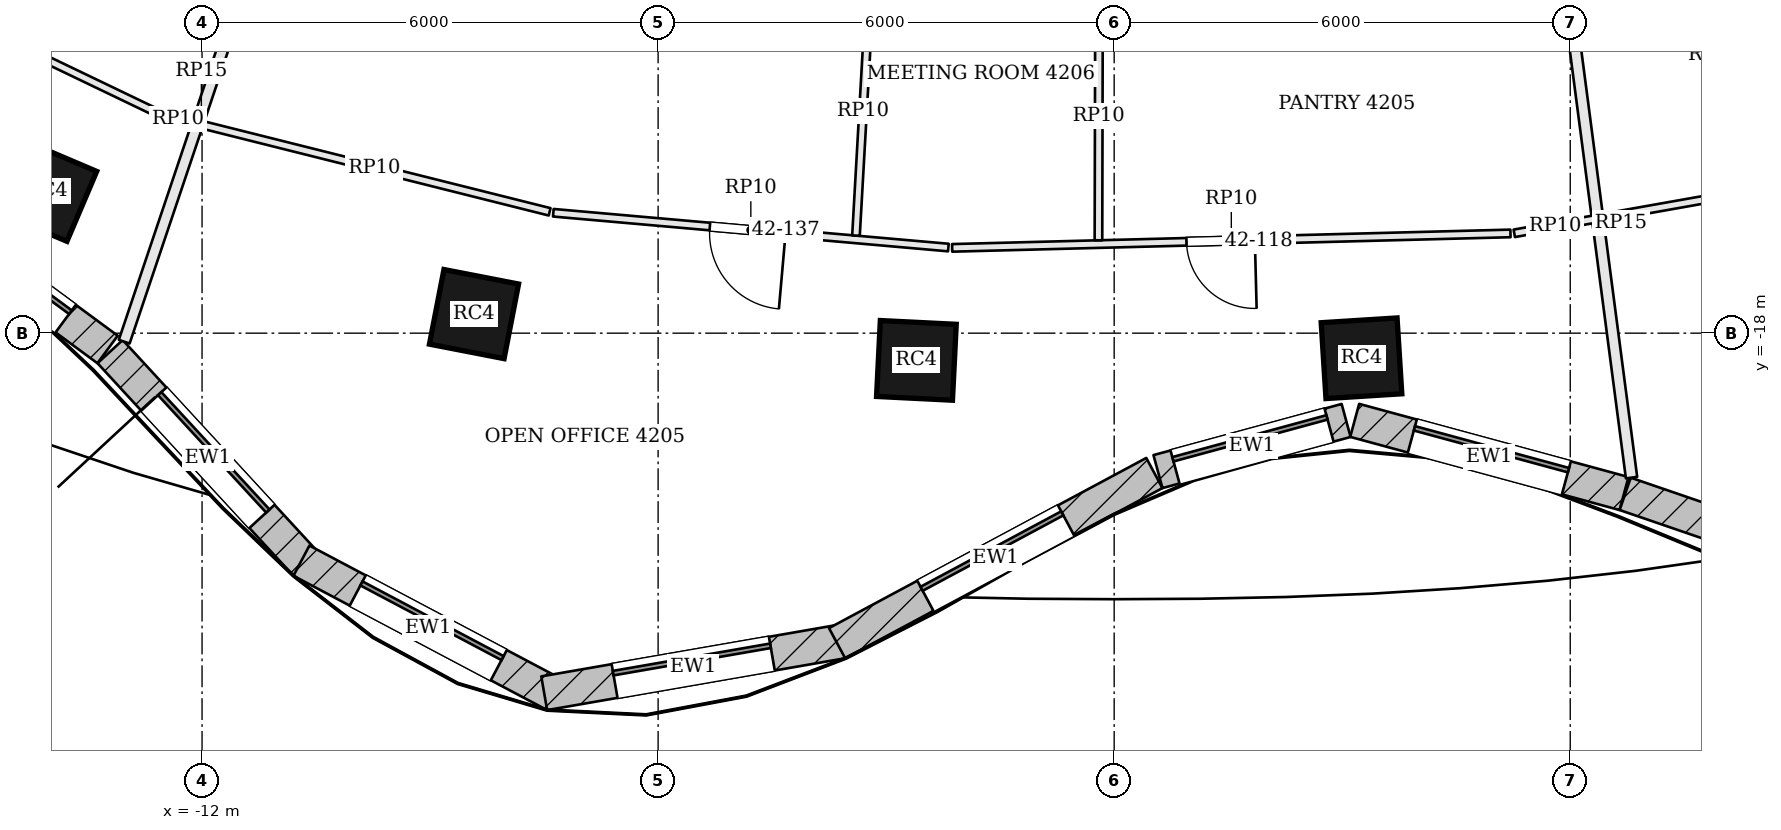
"""IFC4 building model, lengths in metres.
Left out: names, types, materials, properties, quantities, classifications, styles, units other than length and angle.
Written with IfcOpenShell. Run it as: python <this file> out.ifc"""

import sys

from ifc_helpers import new_model, si_unit, direction, frame, frame_2d, origin, origin_2d, place, context, subcontext, project, spatial, rectangle, extrude, element, fill, save


model = new_model("IFC4")
c1 = context("Model", 3, precision=1e-05, world=origin(), true_north=direction((0.0, 1.0)))
c2 = subcontext(c1, "Body", "Model", "MODEL_VIEW")
j1 = project(units=[si_unit("LENGTHUNIT", "METRE"), si_unit("PLANEANGLEUNIT", "RADIAN")], contexts=[c1])
p1 = place(None, origin())
s1 = spatial("IfcSite", under=j1, at=p1, CompositionType="ELEMENT")
p2 = place(p1, origin())
s2 = spatial("IfcBuilding", under=s1, at=p2, CompositionType="ELEMENT")
p3 = place(p2, frame((0.0, 0.0, 174.0)))
s3 = spatial("IfcBuildingStorey", under=s2, at=p3, CompositionType="ELEMENT", Elevation=174.0)
for number, where, z_axis, x_axis in (
    (1, (-14.042, -16.136, -0.7), (0.0, 0.0, 1.0), (0.92, -0.392, 0.0)),
    (2, (-8.422, -17.749, -0.7), (0.0, 0.0, 1.0), (0.982, -0.191, 0.0)),
    (3, (-2.602, -18.358, -0.7), (0.0, 0.0, 1.0), (0.999, -0.05, 0.0)),
    (4, (3.254, -18.33, -0.7), (0.0, 0.0, 1.0), (0.998, 0.063, 0.0)),
):
    element("IfcColumn", number, at=place(p3, frame(where, z_axis=z_axis, x_axis=x_axis)), inside=s3, PredefinedType="COLUMN", context=c2, shape_type="SweptSolid", body=[
        extrude(rectangle(XDim=1.0, YDim=1.0, at=origin_2d()), origin(), (0.0, 0.0, 1.0), 4.6),
    ])
p4 = place(p3, frame((-16.036, -16.158, 0.0), z_axis=(0.0, 0.0, 1.0), x_axis=(0.805181432967, -0.593028549064, 0.0)))
e5 = element("IfcWall", 5, at=p4, inside=s3, PredefinedType="SOLIDWALL", context=c2, shape_type="SweptSolid", body=[
    extrude(rectangle(XDim=3.469, YDim=0.45, at=frame_2d((1.734, 0.0))), origin(), (0.0, 0.0, 1.0), 3.7),
])
p5 = place(p4, frame((0.684, 0.0, 0.9)))
e6 = element("IfcOpeningElement", 6, at=p5, cuts=e5, PredefinedType="OPENING", context=c2, shape_type="SweptSolid", body=[
    extrude(rectangle(XDim=2.1, YDim=2.3, at=frame_2d((1.05, 1.15))), frame((0.0, 0.235, 0.0), z_axis=(0.0, -1.0, 0.0), x_axis=(1.0, 0.0, 0.0)), (0.0, 0.0, 1.0), 0.47),
])
p6 = place(p3, frame((-13.209, -18.243, 0.0), z_axis=(0.0, 0.0, 1.0), x_axis=(0.677612152497, -0.735419452278, 0.0)))
e7 = element("IfcWall", 7, at=p6, inside=s3, PredefinedType="SOLIDWALL", context=c2, shape_type="SweptSolid", body=[
    extrude(rectangle(XDim=3.797, YDim=0.45, at=frame_2d((1.898, 0.0))), origin(), (0.0, 0.0, 1.0), 3.7),
])
p7 = place(p6, frame((0.848, 0.0, 0.9)))
e8 = element("IfcOpeningElement", 8, at=p7, cuts=e7, PredefinedType="OPENING", context=c2, shape_type="SweptSolid", body=[
    extrude(rectangle(XDim=2.1, YDim=2.3, at=frame_2d((1.05, 1.15))), frame((0.0, 0.235, 0.0), z_axis=(0.0, -1.0, 0.0), x_axis=(1.0, 0.0, 0.0)), (0.0, 0.0, 1.0), 0.47),
])
p8 = place(p3, frame((-10.693, -20.993, 0.0), z_axis=(0.0, 0.0, 1.0), x_axis=(0.883817790726, -0.46783128668, 0.0)))
e9 = element("IfcWall", 9, at=p8, inside=s3, PredefinedType="SOLIDWALL", context=c2, shape_type="SweptSolid", body=[
    extrude(rectangle(XDim=3.777, YDim=0.45, at=frame_2d((1.888, 0.0))), origin(), (0.0, 0.0, 1.0), 3.7),
])
p9 = place(p8, frame((0.838, 0.0, 0.9)))
e10 = element("IfcOpeningElement", 10, at=p9, cuts=e9, PredefinedType="OPENING", context=c2, shape_type="SweptSolid", body=[
    extrude(rectangle(XDim=2.1, YDim=2.3, at=frame_2d((1.05, 1.15))), frame((0.0, 0.235, 0.0), z_axis=(0.0, -1.0, 0.0), x_axis=(1.0, 0.0, 0.0)), (0.0, 0.0, 1.0), 0.47),
])
p10 = place(p3, frame((-7.499, -22.737, 0.0), z_axis=(0.0, 0.0, 1.0), x_axis=(0.98521220506, 0.171338585849, 0.0)))
e11 = element("IfcWall", 11, at=p10, inside=s3, PredefinedType="SOLIDWALL", context=c2, shape_type="SweptSolid", body=[
    extrude(rectangle(XDim=3.98, YDim=0.45, at=frame_2d((1.99, 0.0))), origin(), (0.0, 0.0, 1.0), 3.7),
])
p11 = place(p10, frame((0.94, 0.0, 0.9)))
e12 = element("IfcOpeningElement", 12, at=p11, cuts=e11, PredefinedType="OPENING", context=c2, shape_type="SweptSolid", body=[
    extrude(rectangle(XDim=2.1, YDim=2.3, at=frame_2d((1.05, 1.15))), frame((0.0, 0.235, 0.0), z_axis=(0.0, -1.0, 0.0), x_axis=(1.0, 0.0, 0.0)), (0.0, 0.0, 1.0), 0.47),
])
p12 = place(p3, frame((-3.646, -22.079, 0.0), z_axis=(0.0, 0.0, 1.0), x_axis=(0.881279133897, 0.472596115259, 0.0)))
e13 = element("IfcWall", 13, at=p12, inside=s3, PredefinedType="SOLIDWALL", context=c2, shape_type="SweptSolid", body=[
    extrude(rectangle(XDim=4.737, YDim=0.45, at=frame_2d((2.368, 0.0))), origin(), (0.0, 0.0, 1.0), 3.7),
])
p13 = place(p12, frame((1.318, 0.0, 0.9)))
e14 = element("IfcOpeningElement", 14, at=p13, cuts=e13, PredefinedType="OPENING", context=c2, shape_type="SweptSolid", body=[
    extrude(rectangle(XDim=2.1, YDim=2.3, at=frame_2d((1.05, 1.15))), frame((0.0, 0.235, 0.0), z_axis=(0.0, -1.0, 0.0), x_axis=(1.0, 0.0, 0.0)), (0.0, 0.0, 1.0), 0.47),
])
p14 = place(p3, frame((0.576, -19.821, 0.0), z_axis=(0.0, 0.0, 1.0), x_axis=(0.965009398019, 0.262215296532, 0.0)))
e15 = element("IfcWall", 15, at=p14, inside=s3, PredefinedType="SOLIDWALL", context=c2, shape_type="SweptSolid", body=[
    extrude(rectangle(XDim=2.565, YDim=0.45, at=frame_2d((1.283, 0.0))), origin(), (0.0, 0.0, 1.0), 3.7),
])
p15 = place(p14, frame((0.233, 0.0, 0.9)))
e16 = element("IfcOpeningElement", 16, at=p15, cuts=e15, PredefinedType="OPENING", context=c2, shape_type="SweptSolid", body=[
    extrude(rectangle(XDim=2.1, YDim=2.3, at=frame_2d((1.05, 1.15))), frame((0.0, 0.235, 0.0), z_axis=(0.0, -1.0, 0.0), x_axis=(1.0, 0.0, 0.0)), (0.0, 0.0, 1.0), 0.47),
])
p16 = place(p3, frame((3.164, -19.147, 0.0), z_axis=(0.0, 0.0, 1.0), x_axis=(0.965039479998, -0.262104563191, 0.0)))
e17 = element("IfcWall", 17, at=p16, inside=s3, PredefinedType="SOLIDWALL", context=c2, shape_type="SweptSolid", body=[
    extrude(rectangle(XDim=3.672, YDim=0.45, at=frame_2d((1.836, 0.0))), origin(), (0.0, 0.0, 1.0), 3.7),
])
p17 = place(p16, frame((0.786, 0.0, 0.9)))
e18 = element("IfcOpeningElement", 18, at=p17, cuts=e17, PredefinedType="OPENING", context=c2, shape_type="SweptSolid", body=[
    extrude(rectangle(XDim=2.1, YDim=2.3, at=frame_2d((1.05, 1.15))), frame((0.0, 0.235, 0.0), z_axis=(0.0, -1.0, 0.0), x_axis=(1.0, 0.0, 0.0)), (0.0, 0.0, 1.0), 0.47),
])
p18 = place(p3, frame((6.723, -20.114, 0.0), z_axis=(0.0, 0.0, 1.0), x_axis=(0.945947299026, -0.324320377815, 0.0)))
e19 = element("IfcWall", 19, at=p18, inside=s3, PredefinedType="SOLIDWALL", context=c2, shape_type="SweptSolid", body=[
    extrude(rectangle(XDim=4.745, YDim=0.45, at=frame_2d((2.372, 0.0))), origin(), (0.0, 0.0, 1.0), 3.7),
])
p19 = place(p18, frame((1.322, 0.0, 0.9)))
e20 = element("IfcOpeningElement", 20, at=p19, cuts=e19, PredefinedType="OPENING", context=c2, shape_type="SweptSolid", body=[
    extrude(rectangle(XDim=2.1, YDim=2.3, at=frame_2d((1.05, 1.15))), frame((0.0, 0.235, 0.0), z_axis=(0.0, -1.0, 0.0), x_axis=(1.0, 0.0, 0.0)), (0.0, 0.0, 1.0), 0.47),
])
p20 = place(p3, frame((-13.024, -18.112, 0.0), z_axis=(0.0, 0.0, 1.0), x_axis=(0.319081027508, 0.947727438605, 0.0)))
e21 = element("IfcWall", 21, at=p20, inside=s3, PredefinedType="PARTITIONING", context=c2, shape_type="SweptSolid", body=[
    extrude(rectangle(XDim=6.363, YDim=0.15, at=frame_2d((3.181, 0.0))), origin(), (0.0, 0.0, 1.0), 3.234),
])
p21 = place(p3, frame((6.807, -19.901, 0.0), z_axis=(0.0, 0.0, 1.0), x_axis=(-0.129934596003, 0.991522566945, 0.0)))
e22 = element("IfcWall", 22, at=p21, inside=s3, PredefinedType="PARTITIONING", context=c2, shape_type="SweptSolid", body=[
    extrude(rectangle(XDim=6.766, YDim=0.15, at=frame_2d((3.383, 0.0))), origin(), (0.0, 0.0, 1.0), 3.234),
])
p22 = place(p3, frame((-12.078, -15.238, 0.0), z_axis=(0.0, 0.0, 1.0), x_axis=(-0.970024978464, 0.243005228658, 0.0)))
e23 = element("IfcWall", 23, at=p22, inside=s3, PredefinedType="PARTITIONING", context=c2, shape_type="SweptSolid", body=[
    extrude(rectangle(XDim=0.489, YDim=0.1, at=frame_2d((0.245, 0.0))), origin(), (0.0, 0.0, 1.0), 3.084),
])
p23 = place(p3, frame((-12.597, -15.098, 0.0), z_axis=(0.0, 0.0, 1.0), x_axis=(-0.901514437286, 0.432749025839, 0.0)))
e24 = element("IfcWall", 24, at=p23, inside=s3, PredefinedType="PARTITIONING", context=c2, shape_type="SweptSolid", body=[
    extrude(rectangle(XDim=4.42, YDim=0.1, at=frame_2d((2.21, 0.0))), origin(), (0.0, 0.0, 1.0), 3.084),
])
p24 = place(p3, frame((6.34, -16.496, 0.0), z_axis=(0.0, 0.0, 1.0), x_axis=(-0.984632558058, -0.174638843366, 0.0)))
e25 = element("IfcWall", 25, at=p24, inside=s3, PredefinedType="PARTITIONING", context=c2, shape_type="SweptSolid", body=[
    extrude(rectangle(XDim=1.093, YDim=0.1, at=frame_2d((0.547, 0.0))), origin(), (0.0, 0.0, 1.0), 3.084),
])
p25 = place(p3, frame((5.214, -16.688, 0.0), z_axis=(0.0, 0.0, 1.0), x_axis=(-0.999664981446, -0.025882906921, 0.0)))
e26 = element("IfcWall", 26, at=p25, inside=s3, PredefinedType="PARTITIONING", context=c2, shape_type="SweptSolid", body=[
    extrude(rectangle(XDim=7.348, YDim=0.1, at=frame_2d((3.674, 0.0))), origin(), (0.0, 0.0, 1.0), 3.084),
])
p26 = place(p25, frame((3.364, 0.0, 0.0)))
e27 = element("IfcOpeningElement", 27, at=p26, cuts=e26, PredefinedType="OPENING", context=c2, shape_type="SweptSolid", body=[
    extrude(rectangle(XDim=0.9, YDim=2.1, at=frame_2d((0.45, 1.05))), frame((0.0, 0.06, 0.0), z_axis=(0.0, -1.0, 0.0), x_axis=(1.0, 0.0, 0.0)), (0.0, 0.0, 1.0), 0.12),
])
p27 = place(p3, frame((-2.181, -16.874, 0.0), z_axis=(0.0, 0.0, 1.0), x_axis=(-0.996143934904, 0.087734035321, 0.0)))
e28 = element("IfcWall", 28, at=p27, inside=s3, PredefinedType="PARTITIONING", context=c2, shape_type="SweptSolid", body=[
    extrude(rectangle(XDim=5.218, YDim=0.1, at=frame_2d((2.609, 0.0))), origin(), (0.0, 0.0, 1.0), 3.084),
])
p28 = place(p27, frame((2.15, 0.0, 0.0)))
e29 = element("IfcOpeningElement", 29, at=p28, cuts=e28, PredefinedType="OPENING", context=c2, shape_type="SweptSolid", body=[
    extrude(rectangle(XDim=1.0, YDim=2.1, at=frame_2d((0.5, 1.05))), frame((0.0, 0.06, 0.0), z_axis=(0.0, -1.0, 0.0), x_axis=(1.0, 0.0, 0.0)), (0.0, 0.0, 1.0), 0.12),
])
p29 = place(p3, frame((-7.427, -16.404, 0.0), z_axis=(0.0, 0.0, 1.0), x_axis=(-0.970009433409, 0.243067272783, 0.0)))
e30 = element("IfcWall", 30, at=p29, inside=s3, PredefinedType="PARTITIONING", context=c2, shape_type="SweptSolid", body=[
    extrude(rectangle(XDim=4.754, YDim=0.1, at=frame_2d((2.377, 0.0))), origin(), (0.0, 0.0, 1.0), 3.084),
])
p30 = place(p3, frame((-3.211, -13.445, 0.0), z_axis=(0.0, 0.0, 1.0), x_axis=(-0.056703901856, -0.99839103938, 0.0)))
e31 = element("IfcWall", 31, at=p30, inside=s3, PredefinedType="PARTITIONING", context=c2, shape_type="SweptSolid", body=[
    extrude(rectangle(XDim=3.277, YDim=0.1, at=frame_2d((1.638, 0.0))), origin(), (0.0, 0.0, 1.0), 3.084),
])
p31 = place(p3, frame((-0.199, -13.502, 0.0), z_axis=(0.0, 0.0, 1.0), x_axis=(-0.002309978934, -0.999997331995, 0.0)))
e32 = element("IfcWall", 32, at=p31, inside=s3, PredefinedType="PARTITIONING", context=c2, shape_type="SweptSolid", body=[
    extrude(rectangle(XDim=3.276, YDim=0.1, at=frame_2d((1.638, 0.0))), origin(), (0.0, 0.0, 1.0), 3.084),
])
p32 = place(p3, frame((10.441, -15.769, 0.0), z_axis=(0.0, 0.0, 1.0), x_axis=(-0.984637220861, -0.174612551941, 0.0)))
e33 = element("IfcWall", 33, at=p32, inside=s3, PredefinedType="PARTITIONING", context=c2, shape_type="SweptSolid", body=[
    extrude(rectangle(XDim=4.125, YDim=0.1, at=frame_2d((2.062, 0.0))), origin(), (0.0, 0.0, 1.0), 3.084),
])
p33 = place(p5, origin())
e34 = element("IfcWindow", 34, at=p33, inside=s3, PartitioningType="SINGLE_PANEL", PredefinedType="WINDOW", context=c2, shape_type="SweptSolid", body=[
    extrude(rectangle(XDim=2.1, YDim=2.3, at=frame_2d((1.05, 1.15))), frame((0.0, 0.135, 0.0), z_axis=(0.0, -1.0, 0.0), x_axis=(1.0, 0.0, 0.0)), (0.0, 0.0, 1.0), 0.06),
])
fill(e6, e34)
p34 = place(p7, origin())
e35 = element("IfcWindow", 35, at=p34, inside=s3, PartitioningType="SINGLE_PANEL", PredefinedType="WINDOW", context=c2, shape_type="SweptSolid", body=[
    extrude(rectangle(XDim=2.1, YDim=2.3, at=frame_2d((1.05, 1.15))), frame((0.0, 0.135, 0.0), z_axis=(0.0, -1.0, 0.0), x_axis=(1.0, 0.0, 0.0)), (0.0, 0.0, 1.0), 0.06),
])
fill(e8, e35)
p35 = place(p9, origin())
e36 = element("IfcWindow", 36, at=p35, inside=s3, PartitioningType="SINGLE_PANEL", PredefinedType="WINDOW", context=c2, shape_type="SweptSolid", body=[
    extrude(rectangle(XDim=2.1, YDim=2.3, at=frame_2d((1.05, 1.15))), frame((0.0, 0.135, 0.0), z_axis=(0.0, -1.0, 0.0), x_axis=(1.0, 0.0, 0.0)), (0.0, 0.0, 1.0), 0.06),
])
fill(e10, e36)
p36 = place(p11, origin())
e37 = element("IfcWindow", 37, at=p36, inside=s3, PartitioningType="SINGLE_PANEL", PredefinedType="WINDOW", context=c2, shape_type="SweptSolid", body=[
    extrude(rectangle(XDim=2.1, YDim=2.3, at=frame_2d((1.05, 1.15))), frame((0.0, 0.135, 0.0), z_axis=(0.0, -1.0, 0.0), x_axis=(1.0, 0.0, 0.0)), (0.0, 0.0, 1.0), 0.06),
])
fill(e12, e37)
p37 = place(p13, origin())
e38 = element("IfcWindow", 38, at=p37, inside=s3, PartitioningType="SINGLE_PANEL", PredefinedType="WINDOW", context=c2, shape_type="SweptSolid", body=[
    extrude(rectangle(XDim=2.1, YDim=2.3, at=frame_2d((1.05, 1.15))), frame((0.0, 0.135, 0.0), z_axis=(0.0, -1.0, 0.0), x_axis=(1.0, 0.0, 0.0)), (0.0, 0.0, 1.0), 0.06),
])
fill(e14, e38)
p38 = place(p15, origin())
e39 = element("IfcWindow", 39, at=p38, inside=s3, PartitioningType="SINGLE_PANEL", PredefinedType="WINDOW", context=c2, shape_type="SweptSolid", body=[
    extrude(rectangle(XDim=2.1, YDim=2.3, at=frame_2d((1.05, 1.15))), frame((0.0, 0.135, 0.0), z_axis=(0.0, -1.0, 0.0), x_axis=(1.0, 0.0, 0.0)), (0.0, 0.0, 1.0), 0.06),
])
fill(e16, e39)
p39 = place(p17, origin())
e40 = element("IfcWindow", 40, at=p39, inside=s3, PartitioningType="SINGLE_PANEL", PredefinedType="WINDOW", context=c2, shape_type="SweptSolid", body=[
    extrude(rectangle(XDim=2.1, YDim=2.3, at=frame_2d((1.05, 1.15))), frame((0.0, 0.135, 0.0), z_axis=(0.0, -1.0, 0.0), x_axis=(1.0, 0.0, 0.0)), (0.0, 0.0, 1.0), 0.06),
])
fill(e18, e40)
p40 = place(p26, origin())
e41 = element("IfcDoor", 41, at=p40, inside=s3, OperationType="SINGLE_SWING_LEFT", PredefinedType="DOOR", context=c2, shape_type="SweptSolid", body=[
    extrude(rectangle(XDim=0.9, YDim=2.1, at=frame_2d((0.45, 1.05))), frame((0.0, 0.025, 0.0), z_axis=(0.0, -1.0, 0.0), x_axis=(1.0, 0.0, 0.0)), (0.0, 0.0, 1.0), 0.05),
])
fill(e27, e41)
p41 = place(p28, origin())
e42 = element("IfcDoor", 42, at=p41, inside=s3, OperationType="SINGLE_SWING_LEFT", PredefinedType="DOOR", context=c2, shape_type="SweptSolid", body=[
    extrude(rectangle(XDim=1.0, YDim=2.1, at=frame_2d((0.5, 1.05))), frame((0.0, 0.025, 0.0), z_axis=(0.0, -1.0, 0.0), x_axis=(1.0, 0.0, 0.0)), (0.0, 0.0, 1.0), 0.05),
])
fill(e29, e42)
save(model, sys.argv[1])
